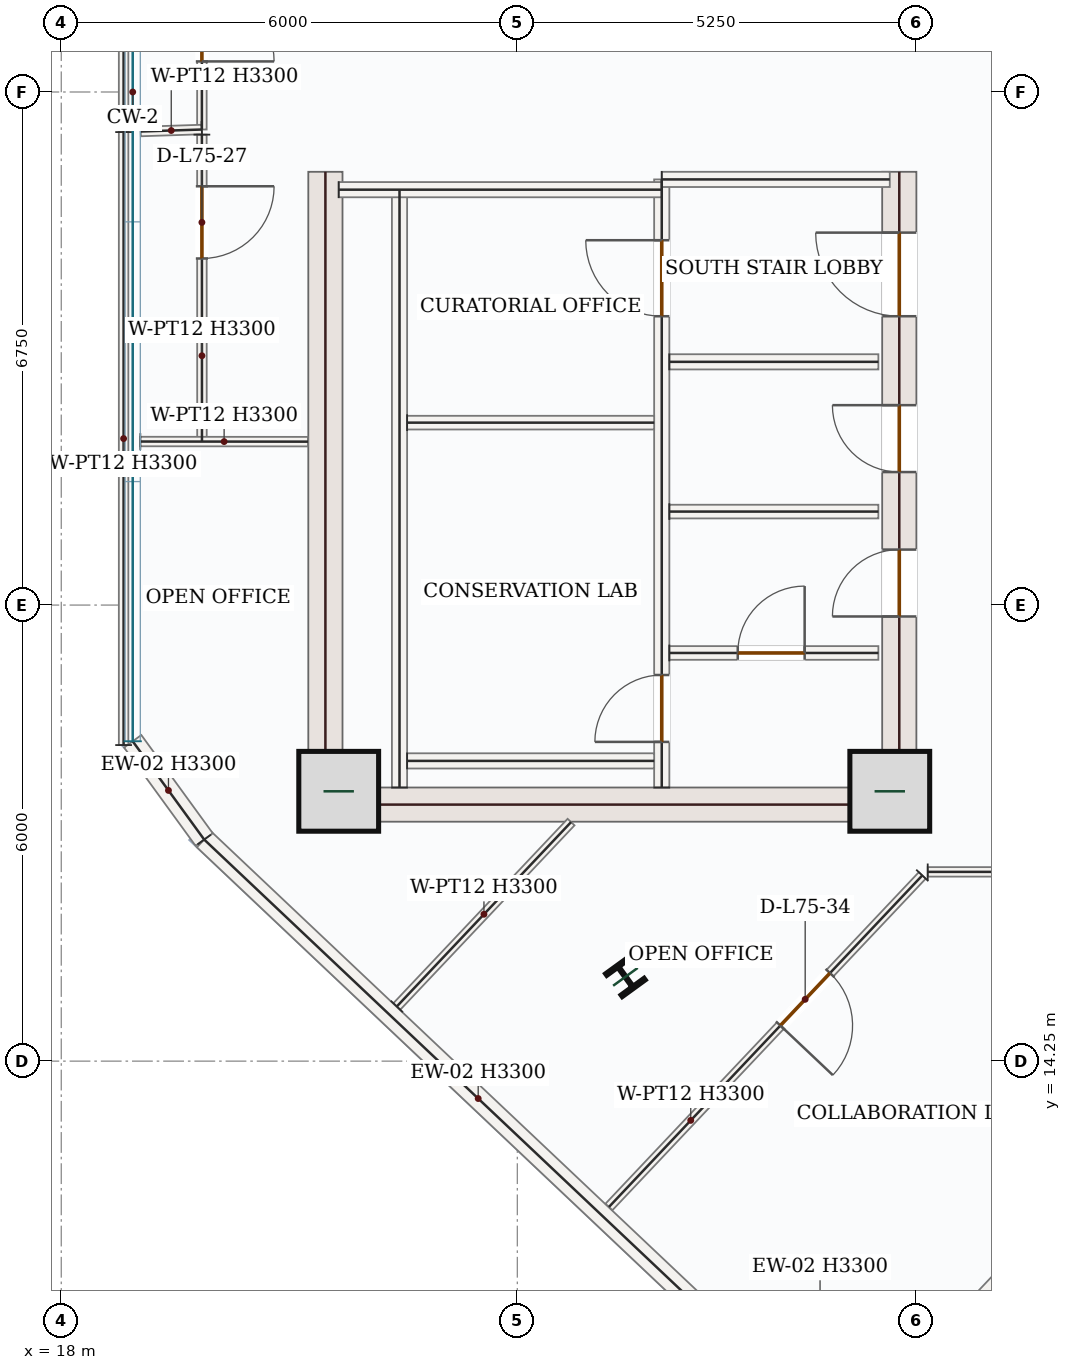
"""IFC4 building model, lengths in metres.
Left out: names, types, materials, properties, quantities, classifications, styles, units other than length and angle.
Written with IfcOpenShell. Run it as: python <this file> out.ifc"""

import sys

from ifc_helpers import new_model, si_unit, direction, frame, frame_2d, origin, origin_2d, place, context, subcontext, project, spatial, rectangle, i_section, extrude, source, transform, mapped, element, fill, save


model = new_model("IFC4")
c1 = context("Model", 3, precision=1e-05, world=origin(), true_north=direction((0.0, 1.0)))
c2 = subcontext(c1, "Body", "Model", "MODEL_VIEW")
j1 = project(units=[si_unit("LENGTHUNIT", "METRE"), si_unit("PLANEANGLEUNIT", "RADIAN")], contexts=[c1])
p1 = place(None, origin())
s1 = spatial("IfcSite", under=j1, at=p1, CompositionType="ELEMENT")
p2 = place(p1, origin())
s2 = spatial("IfcBuilding", under=s1, at=p2, CompositionType="ELEMENT")
p3 = place(p2, frame((0.0, 0.0, 310.35)))
s3 = spatial("IfcBuildingStorey", under=s2, at=p3, CompositionType="ELEMENT", Elevation=310.35)
m1 = source(origin(), c2, "Body", "SweptSolid", [
    extrude(rectangle(XDim=8.55, YDim=0.45, at=frame_2d((4.275, 0.0))), origin(), (0.0, 0.0, 1.0), 3.3),
])
p4 = place(p3, frame((21.475, 17.4, 0.0), z_axis=(0.0, 0.0, 1.0), x_axis=(0.0, 1.0, 0.0)))
e1 = element("IfcWall", 1, at=p4, inside=s3, PredefinedType="SHEAR", context=c2, shape_type="MappedRepresentation", body=[
    mapped(m1, transform((0.0, 0.0, 0.0), x_axis=(1.0, 0.0, 0.0), y_axis=(0.0, 1.0, 0.0), z_axis=(0.0, 0.0, 1.0), scale=1.0)),
])
p5 = place(p3, frame((29.025, 17.4, 0.0), z_axis=(0.0, 0.0, 1.0), x_axis=(0.0, 1.0, 0.0)))
e2 = element("IfcWall", 2, at=p5, inside=s3, PredefinedType="SHEAR", context=c2, shape_type="SweptSolid", body=[
    extrude(rectangle(XDim=8.55, YDim=0.45, at=frame_2d((4.275, 0.0))), origin(), (0.0, 0.0, 1.0), 3.3),
])
p6 = place(p5, frame((6.65, 0.0, 0.0)))
e3 = element("IfcOpeningElement", 3, at=p6, cuts=e2, PredefinedType="OPENING", context=c2, shape_type="SweptSolid", body=[
    extrude(rectangle(XDim=1.1, YDim=2.2, at=frame_2d((0.55, 1.1))), frame((0.0, 0.235, 0.0), z_axis=(0.0, -1.0, 0.0), x_axis=(1.0, 0.0, 0.0)), (0.0, 0.0, 1.0), 0.47),
])
p7 = place(p5, frame((2.7, 0.0, 0.0)))
e4 = element("IfcOpeningElement", 4, at=p7, cuts=e2, PredefinedType="OPENING", context=c2, shape_type="SweptSolid", body=[
    extrude(rectangle(XDim=0.88, YDim=2.1, at=frame_2d((0.44, 1.05))), frame((0.0, 0.235, 0.0), z_axis=(0.0, -1.0, 0.0), x_axis=(1.0, 0.0, 0.0)), (0.0, 0.0, 1.0), 0.47),
])
p8 = place(p5, frame((4.6, 0.0, 0.0)))
e5 = element("IfcOpeningElement", 5, at=p8, cuts=e2, PredefinedType="OPENING", context=c2, shape_type="SweptSolid", body=[
    extrude(rectangle(XDim=0.88, YDim=2.1, at=frame_2d((0.44, 1.05))), frame((0.0, 0.235, 0.0), z_axis=(0.0, -1.0, 0.0), x_axis=(1.0, 0.0, 0.0)), (0.0, 0.0, 1.0), 0.47),
])
m2 = source(origin(), c2, "Body", "SweptSolid", [
    extrude(rectangle(XDim=7.1, YDim=0.45, at=frame_2d((3.55, 0.0))), origin(), (0.0, 0.0, 1.0), 3.3),
])
p9 = place(p3, frame((21.7, 17.625, 0.0), z_axis=(0.0, 0.0, 1.0), x_axis=(1.0, 0.0, 0.0)))
e6 = element("IfcWall", 6, at=p9, inside=s3, PredefinedType="SHEAR", context=c2, shape_type="MappedRepresentation", body=[
    mapped(m2, transform((0.0, 0.0, 0.0), x_axis=(1.0, 0.0, 0.0), y_axis=(0.0, 1.0, 0.0), z_axis=(0.0, 0.0, 1.0), scale=1.0)),
])
m3 = source(origin(), c2, "Body", "SweptSolid", [
    extrude(rectangle(XDim=1.05, YDim=1.05, at=origin_2d()), origin(), (0.0, 0.0, 1.0), 3.75),
])
for number, where, z_axis, x_axis in (
    (7, (21.65, 17.8, 0.0), (0.0, 0.0, 1.0), (1.0, 0.0, 0.0)),
    (8, (28.9, 17.8, 0.0), (0.0, 0.0, 1.0), (1.0, 0.0, 0.0)),
):
    element("IfcColumn", number, at=place(p3, frame(where, z_axis=z_axis, x_axis=x_axis)), inside=s3, PredefinedType="COLUMN", context=c2, shape_type="MappedRepresentation", body=[
        mapped(m3, transform((0.0, 0.0, 0.0), x_axis=(1.0, 0.0, 0.0), y_axis=(0.0, 1.0, 0.0), z_axis=(0.0, 0.0, 1.0), scale=1.0)),
    ])
m4 = source(origin(), c2, "Body", "SweptSolid", [
    extrude(i_section(OverallWidth=0.374, OverallDepth=0.372, WebThickness=0.016, FlangeThickness=0.026, FilletRadius=0.018, at=origin_2d()), origin(), (0.0, 0.0, 1.0), 3.75),
])
p10 = place(p3, frame((25.422, 15.359, 0.0), z_axis=(0.0, 0.0, 1.0), x_axis=(0.809016994375, 0.587785252292, 0.0)))
e9 = element("IfcColumn", 9, at=p10, inside=s3, PredefinedType="COLUMN", context=c2, shape_type="MappedRepresentation", body=[
    mapped(m4, transform((0.0, 0.0, 0.0), x_axis=(1.0, 0.0, 0.0), y_axis=(0.0, 1.0, 0.0), z_axis=(0.0, 0.0, 1.0), scale=1.0)),
])
m5 = source(origin(), c2, "Body", "SweptSolid", [
    extrude(rectangle(XDim=5.945, YDim=0.28, at=frame_2d((2.973, 0.0))), origin(), (0.0, 0.0, 1.0), 3.3),
])
p11 = place(p3, frame((33.577, 14.74, 0.0), z_axis=(0.0, 0.0, 1.0), x_axis=(-0.686888766374, -0.72676256276, 0.0)))
e10 = element("IfcWall", 10, at=p11, inside=s3, PredefinedType="SOLIDWALL", context=c2, shape_type="MappedRepresentation", body=[
    mapped(m5, transform((0.0, 0.0, 0.0), x_axis=(1.0, 0.0, 0.0), y_axis=(0.0, 1.0, 0.0), z_axis=(0.0, 0.0, 1.0), scale=1.0)),
])
m6 = source(origin(), c2, "Body", "SweptSolid", [
    extrude(rectangle(XDim=9.92, YDim=0.28, at=frame_2d((4.96, 0.0))), origin(), (0.0, 0.0, 1.0), 3.3),
])
p12 = place(p3, frame((27.09, 10.351, 0.0), z_axis=(0.0, 0.0, 1.0), x_axis=(-0.726772856404, 0.686877875022, 0.0)))
e11 = element("IfcWall", 11, at=p12, inside=s3, PredefinedType="SOLIDWALL", context=c2, shape_type="MappedRepresentation", body=[
    mapped(m6, transform((0.0, 0.0, 0.0), x_axis=(1.0, 0.0, 0.0), y_axis=(0.0, 1.0, 0.0), z_axis=(0.0, 0.0, 1.0), scale=1.0)),
])
m7 = source(origin(), c2, "Body", "SweptSolid", [
    extrude(rectangle(XDim=1.599, YDim=0.28, at=frame_2d((0.799, 0.0))), origin(), (0.0, 0.0, 1.0), 3.3),
])
p13 = place(p3, frame((19.88, 17.165, 0.0), z_axis=(0.0, 0.0, 1.0), x_axis=(-0.58820801539, 0.808709670173, 0.0)))
e12 = element("IfcWall", 12, at=p13, inside=s3, PredefinedType="SOLIDWALL", context=c2, shape_type="MappedRepresentation", body=[
    mapped(m7, transform((0.0, 0.0, 0.0), x_axis=(1.0, 0.0, 0.0), y_axis=(0.0, 1.0, 0.0), z_axis=(0.0, 0.0, 1.0), scale=1.0)),
])
m8 = source(origin(), c2, "Body", "SweptSolid", [
    extrude(rectangle(XDim=7.87, YDim=0.2, at=frame_2d((3.935, 0.0))), origin(), (0.0, 0.0, 1.0), 3.3),
])
p14 = place(p3, frame((22.45, 17.85, 0.0), z_axis=(0.0, 0.0, 1.0), x_axis=(0.0, 1.0, 0.0)))
e13 = element("IfcWall", 13, at=p14, inside=s3, PredefinedType="SOLIDWALL", context=c2, shape_type="MappedRepresentation", body=[
    mapped(m8, transform((0.0, 0.0, 0.0), x_axis=(1.0, 0.0, 0.0), y_axis=(0.0, 1.0, 0.0), z_axis=(0.0, 0.0, 1.0), scale=1.0)),
])
p15 = place(p3, frame((25.9, 17.85, 0.0), z_axis=(0.0, 0.0, 1.0), x_axis=(0.0, 1.0, 0.0)))
e14 = element("IfcWall", 14, at=p15, inside=s3, PredefinedType="SOLIDWALL", context=c2, shape_type="SweptSolid", body=[
    extrude(rectangle(XDim=8.0, YDim=0.2, at=frame_2d((4.0, 0.0))), origin(), (0.0, 0.0, 1.0), 3.3),
])
p16 = place(p15, frame((6.2, 0.0, 0.0)))
e15 = element("IfcOpeningElement", 15, at=p16, cuts=e14, PredefinedType="OPENING", context=c2, shape_type="SweptSolid", body=[
    extrude(rectangle(XDim=1.0, YDim=2.15, at=frame_2d((0.5, 1.075))), frame((0.0, 0.11, 0.0), z_axis=(0.0, -1.0, 0.0), x_axis=(1.0, 0.0, 0.0)), (0.0, 0.0, 1.0), 0.22),
])
p17 = place(p15, frame((0.6, 0.0, 0.0)))
e16 = element("IfcOpeningElement", 16, at=p17, cuts=e14, PredefinedType="OPENING", context=c2, shape_type="SweptSolid", body=[
    extrude(rectangle(XDim=0.88, YDim=2.1, at=frame_2d((0.44, 1.05))), frame((0.0, 0.11, 0.0), z_axis=(0.0, -1.0, 0.0), x_axis=(1.0, 0.0, 0.0)), (0.0, 0.0, 1.0), 0.22),
])
m9 = source(origin(), c2, "Body", "SweptSolid", [
    extrude(rectangle(XDim=4.25, YDim=0.2, at=frame_2d((2.125, 0.0))), origin(), (0.0, 0.0, 1.0), 3.3),
])
p18 = place(p3, frame((21.65, 25.715, 0.0), z_axis=(0.0, 0.0, 1.0), x_axis=(1.0, 0.0, 0.0)))
e17 = element("IfcWall", 17, at=p18, inside=s3, PredefinedType="SOLIDWALL", context=c2, shape_type="MappedRepresentation", body=[
    mapped(m9, transform((0.0, 0.0, 0.0), x_axis=(1.0, 0.0, 0.0), y_axis=(0.0, 1.0, 0.0), z_axis=(0.0, 0.0, 1.0), scale=1.0)),
])
m10 = source(origin(), c2, "Body", "SweptSolid", [
    extrude(rectangle(XDim=3.0, YDim=0.2, at=frame_2d((1.5, 0.0))), origin(), (0.0, 0.0, 1.0), 3.3),
])
p19 = place(p3, frame((25.9, 25.85, 0.0), z_axis=(0.0, 0.0, 1.0), x_axis=(1.0, 0.0, 0.0)))
e18 = element("IfcWall", 18, at=p19, inside=s3, PredefinedType="SOLIDWALL", context=c2, shape_type="MappedRepresentation", body=[
    mapped(m10, transform((0.0, 0.0, 0.0), x_axis=(1.0, 0.0, 0.0), y_axis=(0.0, 1.0, 0.0), z_axis=(0.0, 0.0, 1.0), scale=1.0)),
])
m11 = source(origin(), c2, "Body", "SweptSolid", [
    extrude(rectangle(XDim=3.25, YDim=0.2, at=frame_2d((1.625, 0.0))), origin(), (0.0, 0.0, 1.0), 3.3),
])
p20 = place(p3, frame((22.55, 18.2, 0.0), z_axis=(0.0, 0.0, 1.0), x_axis=(1.0, 0.0, 0.0)))
e19 = element("IfcWall", 19, at=p20, inside=s3, PredefinedType="SOLIDWALL", context=c2, shape_type="MappedRepresentation", body=[
    mapped(m11, transform((0.0, 0.0, 0.0), x_axis=(1.0, 0.0, 0.0), y_axis=(0.0, 1.0, 0.0), z_axis=(0.0, 0.0, 1.0), scale=1.0)),
])
m12 = source(origin(), c2, "Body", "SweptSolid", [
    extrude(rectangle(XDim=3.25, YDim=0.18, at=frame_2d((1.625, 0.0))), origin(), (0.0, 0.0, 1.0), 3.3),
])
p21 = place(p3, frame((22.55, 22.65, 0.0), z_axis=(0.0, 0.0, 1.0), x_axis=(1.0, 0.0, 0.0)))
e20 = element("IfcWall", 20, at=p21, inside=s3, PredefinedType="PARTITIONING", context=c2, shape_type="MappedRepresentation", body=[
    mapped(m12, transform((0.0, 0.0, 0.0), x_axis=(1.0, 0.0, 0.0), y_axis=(0.0, 1.0, 0.0), z_axis=(0.0, 0.0, 1.0), scale=1.0)),
])
m13 = source(origin(), c2, "Body", "SweptSolid", [
    extrude(rectangle(XDim=2.75, YDim=0.2, at=frame_2d((1.375, 0.0))), origin(), (0.0, 0.0, 1.0), 3.3),
])
p22 = place(p3, frame((26.0, 23.45, 0.0), z_axis=(0.0, 0.0, 1.0), x_axis=(1.0, 0.0, 0.0)))
e21 = element("IfcWall", 21, at=p22, inside=s3, PredefinedType="SOLIDWALL", context=c2, shape_type="MappedRepresentation", body=[
    mapped(m13, transform((0.0, 0.0, 0.0), x_axis=(1.0, 0.0, 0.0), y_axis=(0.0, 1.0, 0.0), z_axis=(0.0, 0.0, 1.0), scale=1.0)),
])
p23 = place(p3, frame((26.0, 19.62, 0.0), z_axis=(0.0, 0.0, 1.0), x_axis=(1.0, 0.0, 0.0)))
e22 = element("IfcWall", 22, at=p23, inside=s3, PredefinedType="PARTITIONING", context=c2, shape_type="SweptSolid", body=[
    extrude(rectangle(XDim=2.75, YDim=0.18, at=frame_2d((1.375, 0.0))), origin(), (0.0, 0.0, 1.0), 3.3),
])
p24 = place(p23, frame((0.9, 0.0, 0.0)))
e23 = element("IfcOpeningElement", 23, at=p24, cuts=e22, PredefinedType="OPENING", context=c2, shape_type="SweptSolid", body=[
    extrude(rectangle(XDim=0.88, YDim=2.1, at=frame_2d((0.44, 1.05))), frame((0.0, 0.1, 0.0), z_axis=(0.0, -1.0, 0.0), x_axis=(1.0, 0.0, 0.0)), (0.0, 0.0, 1.0), 0.2),
])
m14 = source(origin(), c2, "Body", "SweptSolid", [
    extrude(rectangle(XDim=2.75, YDim=0.18, at=frame_2d((1.375, 0.0))), origin(), (0.0, 0.0, 1.0), 3.3),
])
p25 = place(p3, frame((26.0, 21.48, 0.0), z_axis=(0.0, 0.0, 1.0), x_axis=(1.0, 0.0, 0.0)))
e24 = element("IfcWall", 24, at=p25, inside=s3, PredefinedType="PARTITIONING", context=c2, shape_type="MappedRepresentation", body=[
    mapped(m14, transform((0.0, 0.0, 0.0), x_axis=(1.0, 0.0, 0.0), y_axis=(0.0, 1.0, 0.0), z_axis=(0.0, 0.0, 1.0), scale=1.0)),
])
p26 = place(p3, frame((19.851, 31.529, 0.0), z_axis=(0.0, 0.0, 1.0), x_axis=(-9.7219521e-05, -0.999999995274, 0.0)))
e25 = element("IfcWall", 25, at=p26, inside=s3, PredefinedType="PARTITIONING", context=c2, shape_type="SweptSolid", body=[
    extrude(rectangle(XDim=5.022, YDim=0.125, at=frame_2d((2.511, 0.0))), origin(), (0.0, 0.0, 1.0), 3.3),
])
p27 = place(p26, frame((3.177, 0.0, 0.0)))
e26 = element("IfcOpeningElement", 26, at=p27, cuts=e25, PredefinedType="OPENING", context=c2, shape_type="SweptSolid", body=[
    extrude(rectangle(XDim=0.95, YDim=2.15, at=frame_2d((0.475, 1.075))), frame((0.0, 0.073, 0.0), z_axis=(0.0, -1.0, 0.0), x_axis=(1.0, 0.0, 0.0)), (0.0, 0.0, 1.0), 0.145),
])
m15 = source(origin(), c2, "Body", "SweptSolid", [
    extrude(rectangle(XDim=0.804, YDim=0.125, at=frame_2d((0.402, 0.0))), origin(), (0.0, 0.0, 1.0), 3.3),
])
p28 = place(p3, frame((19.849, 26.507, 0.0), z_axis=(0.0, 0.0, 1.0), x_axis=(-0.999452627665, -0.03308239794, 0.0)))
e27 = element("IfcWall", 27, at=p28, inside=s3, PredefinedType="PARTITIONING", context=c2, shape_type="MappedRepresentation", body=[
    mapped(m15, transform((0.0, 0.0, 0.0), x_axis=(1.0, 0.0, 0.0), y_axis=(0.0, 1.0, 0.0), z_axis=(0.0, 0.0, 1.0), scale=1.0)),
])
m16 = source(origin(), c2, "Body", "SweptSolid", [
    extrude(rectangle(XDim=9.119, YDim=0.125, at=frame_2d((4.56, 0.0))), origin(), (0.0, 0.0, 1.0), 3.3),
])
p29 = place(p3, frame((18.82, 26.473, 0.0), z_axis=(0.0, 0.0, 1.0), x_axis=(0.0, 1.0, 0.0)))
e28 = element("IfcWall", 28, at=p29, inside=s3, PredefinedType="PARTITIONING", context=c2, shape_type="MappedRepresentation", body=[
    mapped(m16, transform((0.0, 0.0, 0.0), x_axis=(1.0, 0.0, 0.0), y_axis=(0.0, 1.0, 0.0), z_axis=(0.0, 0.0, 1.0), scale=1.0)),
])
m17 = source(origin(), c2, "Body", "SweptSolid", [
    extrude(rectangle(XDim=3.337, YDim=0.125, at=frame_2d((1.669, 0.0))), origin(), (0.0, 0.0, 1.0), 3.3),
])
p30 = place(p3, frame((22.415, 14.969, 0.0), z_axis=(0.0, 0.0, 1.0), x_axis=(0.686891986515, 0.726759519278, 0.0)))
e29 = element("IfcWall", 29, at=p30, inside=s3, PredefinedType="PARTITIONING", context=c2, shape_type="MappedRepresentation", body=[
    mapped(m17, transform((0.0, 0.0, 0.0), x_axis=(1.0, 0.0, 0.0), y_axis=(0.0, 1.0, 0.0), z_axis=(0.0, 0.0, 1.0), scale=1.0)),
])
p31 = place(p3, frame((29.328, 16.694, 0.0), z_axis=(0.0, 0.0, 1.0), x_axis=(-0.686871949206, -0.726778456886, 0.0)))
e30 = element("IfcWall", 30, at=p31, inside=s3, PredefinedType="PARTITIONING", context=c2, shape_type="SweptSolid", body=[
    extrude(rectangle(XDim=6.001, YDim=0.125, at=frame_2d((3.001, 0.0))), origin(), (0.0, 0.0, 1.0), 3.3),
])
p32 = place(p31, frame((1.768, 0.0, 0.0)))
e31 = element("IfcOpeningElement", 31, at=p32, cuts=e30, PredefinedType="OPENING", context=c2, shape_type="SweptSolid", body=[
    extrude(rectangle(XDim=0.95, YDim=2.15, at=frame_2d((0.475, 1.075))), frame((0.0, 0.073, 0.0), z_axis=(0.0, -1.0, 0.0), x_axis=(1.0, 0.0, 0.0)), (0.0, 0.0, 1.0), 0.145),
])
p33 = place(p3, frame((19.85, 26.439, 0.0), z_axis=(0.0, 0.0, 1.0), x_axis=(0.000241837961, -0.999999970757, 0.0)))
e32 = element("IfcWall", 32, at=p33, inside=s3, PredefinedType="PARTITIONING", context=c2, shape_type="SweptSolid", body=[
    extrude(rectangle(XDim=4.038, YDim=0.125, at=frame_2d((2.019, 0.0))), origin(), (0.0, 0.0, 1.0), 3.3),
])
p34 = place(p33, frame((0.679, 0.0, 0.0)))
e33 = element("IfcOpeningElement", 33, at=p34, cuts=e32, PredefinedType="OPENING", context=c2, shape_type="SweptSolid", body=[
    extrude(rectangle(XDim=0.95, YDim=2.15, at=frame_2d((0.475, 1.075))), frame((0.0, 0.073, 0.0), z_axis=(0.0, -1.0, 0.0), x_axis=(1.0, 0.0, 0.0)), (0.0, 0.0, 1.0), 0.145),
])
m18 = source(origin(), c2, "Body", "SweptSolid", [
    extrude(rectangle(XDim=2.205, YDim=0.125, at=frame_2d((1.103, 0.0))), origin(), (0.0, 0.0, 1.0), 3.3),
])
p35 = place(p3, frame((19.04, 22.402, 0.0), z_axis=(0.0, 0.0, 1.0), x_axis=(0.99999969967, -0.000775021911, 0.0)))
e34 = element("IfcWall", 34, at=p35, inside=s3, PredefinedType="PARTITIONING", context=c2, shape_type="MappedRepresentation", body=[
    mapped(m18, transform((0.0, 0.0, 0.0), x_axis=(1.0, 0.0, 0.0), y_axis=(0.0, 1.0, 0.0), z_axis=(0.0, 0.0, 1.0), scale=1.0)),
])
m19 = source(origin(), c2, "Body", "SweptSolid", [
    extrude(rectangle(XDim=8.064, YDim=0.125, at=frame_2d((4.032, 0.0))), origin(), (0.0, 0.0, 1.0), 3.3),
])
p36 = place(p3, frame((18.82, 18.408, 0.0), z_axis=(0.0, 0.0, 1.0), x_axis=(0.0, 1.0, 0.0)))
e35 = element("IfcWall", 35, at=p36, inside=s3, PredefinedType="PARTITIONING", context=c2, shape_type="MappedRepresentation", body=[
    mapped(m19, transform((0.0, 0.0, 0.0), x_axis=(1.0, 0.0, 0.0), y_axis=(0.0, 1.0, 0.0), z_axis=(0.0, 0.0, 1.0), scale=1.0)),
])
p37 = place(p3, frame((29.399, 16.74, 0.0), z_axis=(0.0, 0.0, 1.0), x_axis=(1.0, 0.0, 0.0)))
e36 = element("IfcWall", 36, at=p37, inside=s3, PredefinedType="PARTITIONING", context=c2, shape_type="SweptSolid", body=[
    extrude(rectangle(XDim=6.881, YDim=0.125, at=frame_2d((3.44, 0.0))), origin(), (0.0, 0.0, 1.0), 3.3),
])
p38 = place(p37, frame((4.626, 0.0, 0.0)))
e37 = element("IfcOpeningElement", 37, at=p38, cuts=e36, PredefinedType="OPENING", context=c2, shape_type="SweptSolid", body=[
    extrude(rectangle(XDim=0.95, YDim=2.15, at=frame_2d((0.475, 1.075))), frame((0.0, 0.073, 0.0), z_axis=(0.0, -1.0, 0.0), x_axis=(1.0, 0.0, 0.0)), (0.0, 0.0, 1.0), 0.145),
])
m20 = source(origin(), c2, "Body", "SweptSolid", [
    extrude(rectangle(XDim=1.0, YDim=2.15, at=frame_2d((0.5, 1.075))), frame((0.0, 0.025, 0.0), z_axis=(0.0, -1.0, 0.0), x_axis=(1.0, 0.0, 0.0)), (0.0, 0.0, 1.0), 0.05),
])
p39 = place(p16, origin())
e38 = element("IfcDoor", 38, at=p39, inside=s3, OperationType="SINGLE_SWING_RIGHT", PredefinedType="DOOR", context=c2, shape_type="MappedRepresentation", body=[
    mapped(m20, transform((0.0, 0.0, 0.0), x_axis=(1.0, 0.0, 0.0), y_axis=(0.0, 1.0, 0.0), z_axis=(0.0, 0.0, 1.0), scale=1.0)),
])
fill(e15, e38)
m21 = source(origin(), c2, "Body", "SweptSolid", [
    extrude(rectangle(XDim=0.88, YDim=2.1, at=frame_2d((0.44, 1.05))), frame((0.0, 0.025, 0.0), z_axis=(0.0, -1.0, 0.0), x_axis=(1.0, 0.0, 0.0)), (0.0, 0.0, 1.0), 0.05),
])
p40 = place(p17, origin())
e39 = element("IfcDoor", 39, at=p40, inside=s3, OperationType="SINGLE_SWING_LEFT", PredefinedType="DOOR", context=c2, shape_type="MappedRepresentation", body=[
    mapped(m21, transform((0.0, 0.0, 0.0), x_axis=(1.0, 0.0, 0.0), y_axis=(0.0, 1.0, 0.0), z_axis=(0.0, 0.0, 1.0), scale=1.0)),
])
fill(e16, e39)
m22 = source(origin(), c2, "Body", "SweptSolid", [
    extrude(rectangle(XDim=1.1, YDim=2.2, at=frame_2d((0.55, 1.1))), frame((0.0, 0.025, 0.0), z_axis=(0.0, -1.0, 0.0), x_axis=(1.0, 0.0, 0.0)), (0.0, 0.0, 1.0), 0.05),
])
p41 = place(p6, origin())
e40 = element("IfcDoor", 40, at=p41, inside=s3, OperationType="SINGLE_SWING_RIGHT", PredefinedType="DOOR", context=c2, shape_type="MappedRepresentation", body=[
    mapped(m22, transform((0.0, 0.0, 0.0), x_axis=(1.0, 0.0, 0.0), y_axis=(0.0, 1.0, 0.0), z_axis=(0.0, 0.0, 1.0), scale=1.0)),
])
fill(e3, e40)
p42 = place(p24, origin())
e41 = element("IfcDoor", 41, at=p42, inside=s3, OperationType="SINGLE_SWING_RIGHT", PredefinedType="DOOR", context=c2, shape_type="MappedRepresentation", body=[
    mapped(m21, transform((0.0, 0.0, 0.0), x_axis=(1.0, 0.0, 0.0), y_axis=(0.0, 1.0, 0.0), z_axis=(0.0, 0.0, 1.0), scale=1.0)),
])
fill(e23, e41)
p43 = place(p7, origin())
e42 = element("IfcDoor", 42, at=p43, inside=s3, OperationType="SINGLE_SWING_LEFT", PredefinedType="DOOR", context=c2, shape_type="MappedRepresentation", body=[
    mapped(m21, transform((0.0, 0.0, 0.0), x_axis=(1.0, 0.0, 0.0), y_axis=(0.0, 1.0, 0.0), z_axis=(0.0, 0.0, 1.0), scale=1.0)),
])
fill(e4, e42)
p44 = place(p8, origin())
e43 = element("IfcDoor", 43, at=p44, inside=s3, OperationType="SINGLE_SWING_RIGHT", PredefinedType="DOOR", context=c2, shape_type="MappedRepresentation", body=[
    mapped(m21, transform((0.0, 0.0, 0.0), x_axis=(1.0, 0.0, 0.0), y_axis=(0.0, 1.0, 0.0), z_axis=(0.0, 0.0, 1.0), scale=1.0)),
])
fill(e5, e43)
m23 = source(origin(), c2, "Body", "SweptSolid", [
    extrude(rectangle(XDim=0.95, YDim=2.15, at=frame_2d((0.475, 1.075))), frame((0.0, 0.025, 0.0), z_axis=(0.0, -1.0, 0.0), x_axis=(1.0, 0.0, 0.0)), (0.0, 0.0, 1.0), 0.05),
])
p45 = place(p27, origin())
e44 = element("IfcDoor", 44, at=p45, inside=s3, OperationType="SINGLE_SWING_RIGHT", PredefinedType="DOOR", context=c2, shape_type="MappedRepresentation", body=[
    mapped(m23, transform((0.0, 0.0, 0.0), x_axis=(1.0, 0.0, 0.0), y_axis=(0.0, 1.0, 0.0), z_axis=(0.0, 0.0, 1.0), scale=1.0)),
])
fill(e26, e44)
p46 = place(p34, origin())
e45 = element("IfcDoor", 45, at=p46, inside=s3, OperationType="SINGLE_SWING_LEFT", PredefinedType="DOOR", context=c2, shape_type="MappedRepresentation", body=[
    mapped(m23, transform((0.0, 0.0, 0.0), x_axis=(1.0, 0.0, 0.0), y_axis=(0.0, 1.0, 0.0), z_axis=(0.0, 0.0, 1.0), scale=1.0)),
])
fill(e33, e45)
p47 = place(p32, origin())
e46 = element("IfcDoor", 46, at=p47, inside=s3, OperationType="SINGLE_SWING_RIGHT", PredefinedType="DOOR", context=c2, shape_type="MappedRepresentation", body=[
    mapped(m23, transform((0.0, 0.0, 0.0), x_axis=(1.0, 0.0, 0.0), y_axis=(0.0, 1.0, 0.0), z_axis=(0.0, 0.0, 1.0), scale=1.0)),
])
fill(e31, e46)
save(model, sys.argv[1])
